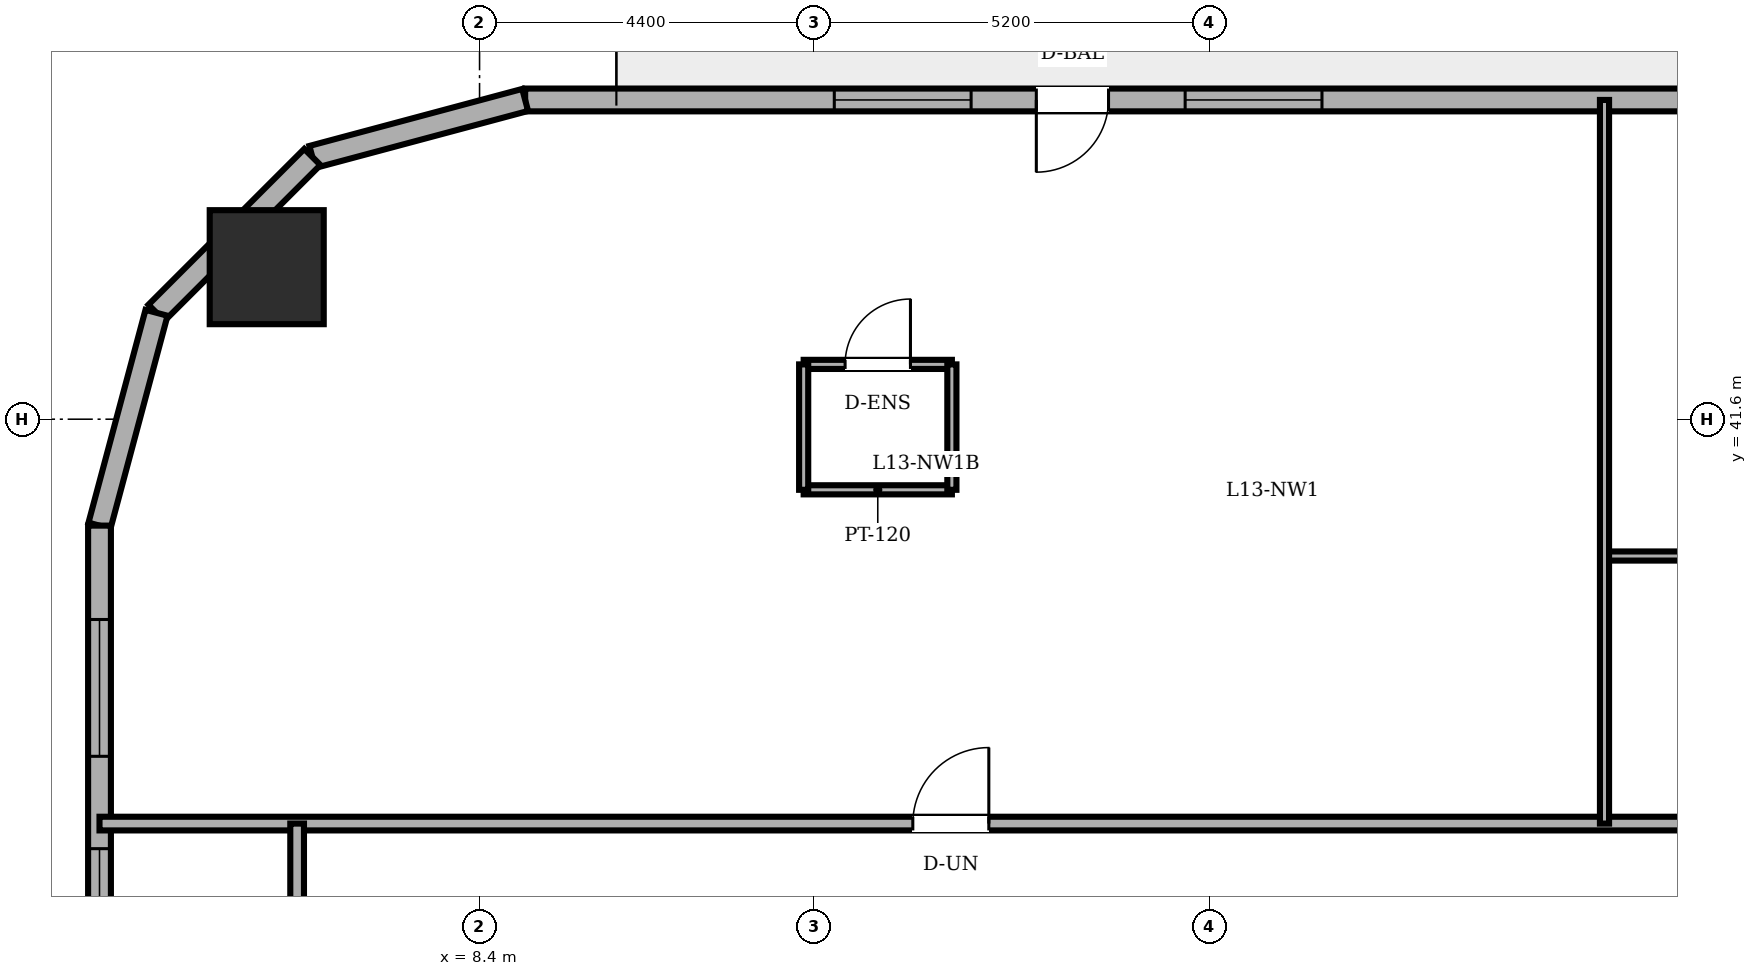
"""IFC4 building model, lengths in metres.
Left out: names, types, materials, properties, quantities, classifications, styles, units other than length and angle.
Written with IfcOpenShell. Run it as: python <this file> out.ifc"""

import sys

from ifc_helpers import new_model, si_unit, direction, frame, frame_2d, origin, origin_2d, place, context, subcontext, project, spatial, rectangle, circle, extrude, element, fill, save


model = new_model("IFC4")
c1 = context("Model", 3, precision=1e-05, world=origin(), true_north=direction((0.0, 1.0)))
c2 = subcontext(c1, "Body", "Model", "MODEL_VIEW")
j1 = project(units=[si_unit("LENGTHUNIT", "METRE"), si_unit("PLANEANGLEUNIT", "RADIAN")], contexts=[c1])
p1 = place(None, origin())
s1 = spatial("IfcSite", under=j1, at=p1, CompositionType="ELEMENT")
p2 = place(p1, origin())
s2 = spatial("IfcBuilding", under=s1, at=p2, CompositionType="ELEMENT")
p3 = place(p2, frame((0.0, 0.0, 50.4)))
s3 = spatial("IfcBuildingStorey", under=s2, at=p3, CompositionType="ELEMENT", Elevation=50.4)
p4 = place(p3, frame((5.6, 43.6, 0.0), z_axis=(0.0, 0.0, 1.0), x_axis=(1.0, 0.0, 0.0)))
e1 = element("IfcColumn", 1, at=p4, inside=s3, PredefinedType="COLUMN", context=c2, shape_type="SweptSolid", body=[
    extrude(circle(Radius=0.75, at=origin_2d()), origin(), (0.0, 0.0, 1.0), 3.6),
])
p5 = place(p3, frame((39.079, 45.8, 0.0), z_axis=(0.0, 0.0, 1.0), x_axis=(-1.0, 0.0, 0.0)))
e2 = element("IfcWall", 2, at=p5, inside=s3, PredefinedType="SOLIDWALL", context=c2, shape_type="SweptSolid", body=[
    extrude(rectangle(XDim=30.079, YDim=0.3, at=frame_2d((15.04, 0.0))), origin(), (0.0, 0.0, 1.0), 3.4),
])
p6 = place(p5, frame((22.404, 0.0, 0.0)))
e3 = element("IfcOpeningElement", 3, at=p6, cuts=e2, PredefinedType="OPENING", context=c2, shape_type="SweptSolid", body=[
    extrude(rectangle(XDim=0.95, YDim=2.2, at=frame_2d((0.475, 1.1))), frame((0.0, 0.16, 0.0), z_axis=(0.0, -1.0, 0.0), x_axis=(1.0, 0.0, 0.0)), (0.0, 0.0, 1.0), 0.32),
])
p7 = place(p5, frame((2.226, 0.0, 0.85)))
e4 = element("IfcOpeningElement", 4, at=p7, cuts=e2, PredefinedType="OPENING", context=c2, shape_type="SweptSolid", body=[
    extrude(rectangle(XDim=1.8, YDim=1.55, at=frame_2d((0.9, 0.775))), frame((0.0, 0.16, 0.0), z_axis=(0.0, -1.0, 0.0), x_axis=(1.0, 0.0, 0.0)), (0.0, 0.0, 1.0), 0.32),
])
p8 = place(p5, frame((5.003, 0.0, 0.85)))
e5 = element("IfcOpeningElement", 5, at=p8, cuts=e2, PredefinedType="OPENING", context=c2, shape_type="SweptSolid", body=[
    extrude(rectangle(XDim=1.8, YDim=1.55, at=frame_2d((0.9, 0.775))), frame((0.0, 0.16, 0.0), z_axis=(0.0, -1.0, 0.0), x_axis=(1.0, 0.0, 0.0)), (0.0, 0.0, 1.0), 0.32),
])
p9 = place(p5, frame((10.179, 0.0, 0.85)))
e6 = element("IfcOpeningElement", 6, at=p9, cuts=e2, PredefinedType="OPENING", context=c2, shape_type="SweptSolid", body=[
    extrude(rectangle(XDim=1.8, YDim=1.55, at=frame_2d((0.9, 0.775))), frame((0.0, 0.16, 0.0), z_axis=(0.0, -1.0, 0.0), x_axis=(1.0, 0.0, 0.0)), (0.0, 0.0, 1.0), 0.32),
])
p10 = place(p5, frame((12.579, 0.0, 0.85)))
e7 = element("IfcOpeningElement", 7, at=p10, cuts=e2, PredefinedType="OPENING", context=c2, shape_type="SweptSolid", body=[
    extrude(rectangle(XDim=1.8, YDim=1.55, at=frame_2d((0.9, 0.775))), frame((0.0, 0.16, 0.0), z_axis=(0.0, -1.0, 0.0), x_axis=(1.0, 0.0, 0.0)), (0.0, 0.0, 1.0), 0.32),
])
p11 = place(p5, frame((19.596, 0.0, 0.85)))
e8 = element("IfcOpeningElement", 8, at=p11, cuts=e2, PredefinedType="OPENING", context=c2, shape_type="SweptSolid", body=[
    extrude(rectangle(XDim=1.8, YDim=1.55, at=frame_2d((0.9, 0.775))), frame((0.0, 0.16, 0.0), z_axis=(0.0, -1.0, 0.0), x_axis=(1.0, 0.0, 0.0)), (0.0, 0.0, 1.0), 0.32),
])
p12 = place(p5, frame((24.212, 0.0, 0.85)))
e9 = element("IfcOpeningElement", 9, at=p12, cuts=e2, PredefinedType="OPENING", context=c2, shape_type="SweptSolid", body=[
    extrude(rectangle(XDim=1.8, YDim=1.55, at=frame_2d((0.9, 0.775))), frame((0.0, 0.16, 0.0), z_axis=(0.0, -1.0, 0.0), x_axis=(1.0, 0.0, 0.0)), (0.0, 0.0, 1.0), 0.32),
])
p13 = place(p3, frame((9.0, 45.8, 0.0), z_axis=(0.0, 0.0, 1.0), x_axis=(-0.96594917914, -0.258731875344, 0.0)))
e10 = element("IfcWall", 10, at=p13, inside=s3, PredefinedType="SOLIDWALL", context=c2, shape_type="SweptSolid", body=[
    extrude(rectangle(XDim=2.899, YDim=0.3, at=frame_2d((1.449, 0.0))), origin(), (0.0, 0.0, 1.0), 3.4),
])
p14 = place(p3, frame((6.2, 45.05, 0.0), z_axis=(0.0, 0.0, 1.0), x_axis=(-0.707106781187, -0.707106781187, 0.0)))
e11 = element("IfcWall", 11, at=p14, inside=s3, PredefinedType="SOLIDWALL", context=c2, shape_type="SweptSolid", body=[
    extrude(rectangle(XDim=2.899, YDim=0.3, at=frame_2d((1.45, 0.0))), origin(), (0.0, 0.0, 1.0), 3.4),
])
p15 = place(p3, frame((4.15, 43.0, 0.0), z_axis=(0.0, 0.0, 1.0), x_axis=(-0.258731875344, -0.96594917914, 0.0)))
e12 = element("IfcWall", 12, at=p15, inside=s3, PredefinedType="SOLIDWALL", context=c2, shape_type="SweptSolid", body=[
    extrude(rectangle(XDim=2.899, YDim=0.3, at=frame_2d((1.449, 0.0))), origin(), (0.0, 0.0, 1.0), 3.4),
])
p16 = place(p3, frame((3.4, 40.2, 0.0), z_axis=(0.0, 0.0, 1.0), x_axis=(0.0, -1.0, 0.0)))
e13 = element("IfcWall", 13, at=p16, inside=s3, PredefinedType="SOLIDWALL", context=c2, shape_type="SweptSolid", body=[
    extrude(rectangle(XDim=32.4, YDim=0.3, at=frame_2d((16.2, 0.0))), origin(), (0.0, 0.0, 1.0), 3.4),
])
p17 = place(p16, frame((1.235, 0.0, 0.85)))
e14 = element("IfcOpeningElement", 14, at=p17, cuts=e13, PredefinedType="OPENING", context=c2, shape_type="SweptSolid", body=[
    extrude(rectangle(XDim=1.8, YDim=1.55, at=frame_2d((0.9, 0.775))), frame((0.0, 0.16, 0.0), z_axis=(0.0, -1.0, 0.0), x_axis=(1.0, 0.0, 0.0)), (0.0, 0.0, 1.0), 0.32),
])
p18 = place(p16, frame((4.25, 0.0, 0.85)))
e15 = element("IfcOpeningElement", 15, at=p18, cuts=e13, PredefinedType="OPENING", context=c2, shape_type="SweptSolid", body=[
    extrude(rectangle(XDim=1.8, YDim=1.55, at=frame_2d((0.9, 0.775))), frame((0.0, 0.16, 0.0), z_axis=(0.0, -1.0, 0.0), x_axis=(1.0, 0.0, 0.0)), (0.0, 0.0, 1.0), 0.32),
])
p19 = place(p16, frame((9.253, 0.0, 0.85)))
e16 = element("IfcOpeningElement", 16, at=p19, cuts=e13, PredefinedType="OPENING", context=c2, shape_type="SweptSolid", body=[
    extrude(rectangle(XDim=1.8, YDim=1.55, at=frame_2d((0.9, 0.775))), frame((0.0, 0.16, 0.0), z_axis=(0.0, -1.0, 0.0), x_axis=(1.0, 0.0, 0.0)), (0.0, 0.0, 1.0), 0.32),
])
p20 = place(p16, frame((13.027, 0.0, 0.85)))
e17 = element("IfcOpeningElement", 17, at=p20, cuts=e13, PredefinedType="OPENING", context=c2, shape_type="SweptSolid", body=[
    extrude(rectangle(XDim=1.8, YDim=1.55, at=frame_2d((0.9, 0.775))), frame((0.0, 0.16, 0.0), z_axis=(0.0, -1.0, 0.0), x_axis=(1.0, 0.0, 0.0)), (0.0, 0.0, 1.0), 0.32),
])
p21 = place(p16, frame((19.573, 0.0, 0.85)))
e18 = element("IfcOpeningElement", 18, at=p21, cuts=e13, PredefinedType="OPENING", context=c2, shape_type="SweptSolid", body=[
    extrude(rectangle(XDim=1.8, YDim=1.55, at=frame_2d((0.9, 0.775))), frame((0.0, 0.16, 0.0), z_axis=(0.0, -1.0, 0.0), x_axis=(1.0, 0.0, 0.0)), (0.0, 0.0, 1.0), 0.32),
])
p22 = place(p16, frame((22.347, 0.0, 0.85)))
e19 = element("IfcOpeningElement", 19, at=p22, cuts=e13, PredefinedType="OPENING", context=c2, shape_type="SweptSolid", body=[
    extrude(rectangle(XDim=1.8, YDim=1.55, at=frame_2d((0.9, 0.775))), frame((0.0, 0.16, 0.0), z_axis=(0.0, -1.0, 0.0), x_axis=(1.0, 0.0, 0.0)), (0.0, 0.0, 1.0), 0.32),
])
p23 = place(p16, frame((26.35, 0.0, 0.85)))
e20 = element("IfcOpeningElement", 20, at=p23, cuts=e13, PredefinedType="OPENING", context=c2, shape_type="SweptSolid", body=[
    extrude(rectangle(XDim=1.8, YDim=1.55, at=frame_2d((0.9, 0.775))), frame((0.0, 0.16, 0.0), z_axis=(0.0, -1.0, 0.0), x_axis=(1.0, 0.0, 0.0)), (0.0, 0.0, 1.0), 0.32),
])
p24 = place(p16, frame((29.365, 0.0, 0.85)))
e21 = element("IfcOpeningElement", 21, at=p24, cuts=e13, PredefinedType="OPENING", context=c2, shape_type="SweptSolid", body=[
    extrude(rectangle(XDim=1.8, YDim=1.55, at=frame_2d((0.9, 0.775))), frame((0.0, 0.16, 0.0), z_axis=(0.0, -1.0, 0.0), x_axis=(1.0, 0.0, 0.0)), (0.0, 0.0, 1.0), 0.32),
])
p25 = place(p3, frame((12.664, 42.321, 0.0), z_axis=(0.0, 0.0, 1.0), x_axis=(1.0, 0.0, 0.0)))
e22 = element("IfcWall", 22, at=p25, inside=s3, PredefinedType="PARTITIONING", context=c2, shape_type="SweptSolid", body=[
    extrude(rectangle(XDim=1.95, YDim=0.12, at=frame_2d((0.975, 0.0))), origin(), (0.0, 0.0, 1.0), 3.4),
])
p26 = place(p25, frame((0.545, 0.0, 0.0)))
e23 = element("IfcOpeningElement", 23, at=p26, cuts=e22, PredefinedType="OPENING", context=c2, shape_type="SweptSolid", body=[
    extrude(rectangle(XDim=0.86, YDim=2.1, at=frame_2d((0.43, 1.05))), frame((0.0, 0.07, 0.0), z_axis=(0.0, -1.0, 0.0), x_axis=(1.0, 0.0, 0.0)), (0.0, 0.0, 1.0), 0.14),
])
p27 = place(p3, frame((14.614, 40.671, 0.0), z_axis=(0.0, 0.0, 1.0), x_axis=(-1.0, 0.0, 0.0)))
e24 = element("IfcWall", 24, at=p27, inside=s3, PredefinedType="PARTITIONING", context=c2, shape_type="SweptSolid", body=[
    extrude(rectangle(XDim=1.95, YDim=0.12, at=frame_2d((0.975, 0.0))), origin(), (0.0, 0.0, 1.0), 3.4),
])
for number, where, z_axis, x_axis in (
    (25, (12.664, 42.321, 0.0), (0.0, 0.0, 1.0), (0.0, -1.0, 0.0)),
    (26, (14.614, 40.671, 0.0), (0.0, 0.0, 1.0), (0.0, 1.0, 0.0)),
):
    element("IfcWall", number, at=place(p3, frame(where, z_axis=z_axis, x_axis=x_axis)), inside=s3, PredefinedType="PARTITIONING", context=c2, shape_type="SweptSolid", body=[
        extrude(rectangle(XDim=1.65, YDim=0.12, at=frame_2d((0.825, 0.0))), origin(), (0.0, 0.0, 1.0), 3.4),
    ])
p28 = place(p3, frame((3.4, 36.28, 0.0), z_axis=(0.0, 0.0, 1.0), x_axis=(1.0, 0.0, 0.0)))
e27 = element("IfcWall", 27, at=p28, inside=s3, PredefinedType="PARTITIONING", context=c2, shape_type="SweptSolid", body=[
    extrude(rectangle(XDim=36.45, YDim=0.18, at=frame_2d((18.225, 0.0))), origin(), (0.0, 0.0, 1.0), 3.4),
])
p29 = place(p28, frame((21.05, 0.0, 0.0)))
e28 = element("IfcOpeningElement", 28, at=p29, cuts=e27, PredefinedType="OPENING", context=c2, shape_type="SweptSolid", body=[
    extrude(rectangle(XDim=0.9, YDim=2.1, at=frame_2d((0.45, 1.05))), frame((0.0, 0.1, 0.0), z_axis=(0.0, -1.0, 0.0), x_axis=(1.0, 0.0, 0.0)), (0.0, 0.0, 1.0), 0.2),
])
p30 = place(p28, frame((24.67, 0.0, 0.0)))
e29 = element("IfcOpeningElement", 29, at=p30, cuts=e27, PredefinedType="OPENING", context=c2, shape_type="SweptSolid", body=[
    extrude(rectangle(XDim=0.86, YDim=2.1, at=frame_2d((0.43, 1.05))), frame((0.0, 0.1, 0.0), z_axis=(0.0, -1.0, 0.0), x_axis=(1.0, 0.0, 0.0)), (0.0, 0.0, 1.0), 0.2),
])
p31 = place(p28, frame((10.7, 0.0, 0.0)))
e30 = element("IfcOpeningElement", 30, at=p31, cuts=e27, PredefinedType="OPENING", context=c2, shape_type="SweptSolid", body=[
    extrude(rectangle(XDim=1.0, YDim=2.15, at=frame_2d((0.5, 1.075))), frame((0.0, 0.1, 0.0), z_axis=(0.0, -1.0, 0.0), x_axis=(1.0, 0.0, 0.0)), (0.0, 0.0, 1.0), 0.2),
])
p32 = place(p28, frame((30.965, 0.0, 0.0)))
e31 = element("IfcOpeningElement", 31, at=p32, cuts=e27, PredefinedType="OPENING", context=c2, shape_type="SweptSolid", body=[
    extrude(rectangle(XDim=1.0, YDim=2.15, at=frame_2d((0.5, 1.075))), frame((0.0, 0.1, 0.0), z_axis=(0.0, -1.0, 0.0), x_axis=(1.0, 0.0, 0.0)), (0.0, 0.0, 1.0), 0.2),
])
p33 = place(p3, frame((23.2, 39.8, 0.0), z_axis=(0.0, 0.0, 1.0), x_axis=(1.0, 0.0, 0.0)))
e32 = element("IfcWall", 32, at=p33, inside=s3, PredefinedType="PARTITIONING", context=c2, shape_type="SweptSolid", body=[
    extrude(rectangle(XDim=7.2, YDim=0.12, at=frame_2d((3.6, 0.0))), origin(), (0.0, 0.0, 1.0), 3.4),
])
p34 = place(p3, frame((6.0, 33.82, 0.0), z_axis=(0.0, 0.0, 1.0), x_axis=(0.0, 1.0, 0.0)))
e33 = element("IfcWall", 33, at=p34, inside=s3, PredefinedType="PARTITIONING", context=c2, shape_type="SweptSolid", body=[
    extrude(rectangle(XDim=2.46, YDim=0.18, at=frame_2d((1.23, 0.0))), origin(), (0.0, 0.0, 1.0), 3.4),
])
p35 = place(p3, frame((23.2, 36.28, 0.0), z_axis=(0.0, 0.0, 1.0), x_axis=(0.0, 1.0, 0.0)))
e34 = element("IfcWall", 34, at=p35, inside=s3, PredefinedType="PARTITIONING", context=c2, shape_type="SweptSolid", body=[
    extrude(rectangle(XDim=9.52, YDim=0.12, at=frame_2d((4.76, 0.0))), origin(), (0.0, 0.0, 1.0), 3.4),
])
p36 = place(p6, origin())
e35 = element("IfcDoor", 35, at=p36, inside=s3, OperationType="SINGLE_SWING_RIGHT", PredefinedType="DOOR", context=c2, shape_type="SweptSolid", body=[
    extrude(rectangle(XDim=0.95, YDim=2.2, at=frame_2d((0.475, 1.1))), frame((0.0, 0.025, 0.0), z_axis=(0.0, -1.0, 0.0), x_axis=(1.0, 0.0, 0.0)), (0.0, 0.0, 1.0), 0.05),
])
fill(e3, e35)
p37 = place(p11, origin())
e36 = element("IfcWindow", 36, at=p37, inside=s3, PartitioningType="DOUBLE_PANEL_VERTICAL", PredefinedType="WINDOW", context=c2, shape_type="SweptSolid", body=[
    extrude(rectangle(XDim=1.8, YDim=1.55, at=frame_2d((0.9, 0.775))), frame((0.0, 0.03, 0.0), z_axis=(0.0, -1.0, 0.0), x_axis=(1.0, 0.0, 0.0)), (0.0, 0.0, 1.0), 0.06),
])
fill(e8, e36)
p38 = place(p12, origin())
e37 = element("IfcWindow", 37, at=p38, inside=s3, PartitioningType="DOUBLE_PANEL_VERTICAL", PredefinedType="WINDOW", context=c2, shape_type="SweptSolid", body=[
    extrude(rectangle(XDim=1.8, YDim=1.55, at=frame_2d((0.9, 0.775))), frame((0.0, 0.03, 0.0), z_axis=(0.0, -1.0, 0.0), x_axis=(1.0, 0.0, 0.0)), (0.0, 0.0, 1.0), 0.06),
])
fill(e9, e37)
p39 = place(p17, origin())
e38 = element("IfcWindow", 38, at=p39, inside=s3, PartitioningType="DOUBLE_PANEL_VERTICAL", PredefinedType="WINDOW", context=c2, shape_type="SweptSolid", body=[
    extrude(rectangle(XDim=1.8, YDim=1.55, at=frame_2d((0.9, 0.775))), frame((0.0, 0.03, 0.0), z_axis=(0.0, -1.0, 0.0), x_axis=(1.0, 0.0, 0.0)), (0.0, 0.0, 1.0), 0.06),
])
fill(e14, e38)
p40 = place(p18, origin())
e39 = element("IfcWindow", 39, at=p40, inside=s3, PartitioningType="DOUBLE_PANEL_VERTICAL", PredefinedType="WINDOW", context=c2, shape_type="SweptSolid", body=[
    extrude(rectangle(XDim=1.8, YDim=1.55, at=frame_2d((0.9, 0.775))), frame((0.0, 0.03, 0.0), z_axis=(0.0, -1.0, 0.0), x_axis=(1.0, 0.0, 0.0)), (0.0, 0.0, 1.0), 0.06),
])
fill(e15, e39)
p41 = place(p26, origin())
e40 = element("IfcDoor", 40, at=p41, inside=s3, OperationType="SINGLE_SWING_RIGHT", PredefinedType="DOOR", context=c2, shape_type="SweptSolid", body=[
    extrude(rectangle(XDim=0.86, YDim=2.1, at=frame_2d((0.43, 1.05))), frame((0.0, 0.025, 0.0), z_axis=(0.0, -1.0, 0.0), x_axis=(1.0, 0.0, 0.0)), (0.0, 0.0, 1.0), 0.05),
])
fill(e23, e40)
p42 = place(p31, origin())
e41 = element("IfcDoor", 41, at=p42, inside=s3, OperationType="SINGLE_SWING_RIGHT", PredefinedType="DOOR", context=c2, shape_type="SweptSolid", body=[
    extrude(rectangle(XDim=1.0, YDim=2.15, at=frame_2d((0.5, 1.075))), frame((0.0, 0.025, 0.0), z_axis=(0.0, -1.0, 0.0), x_axis=(1.0, 0.0, 0.0)), (0.0, 0.0, 1.0), 0.05),
])
fill(e30, e41)
save(model, sys.argv[1])
